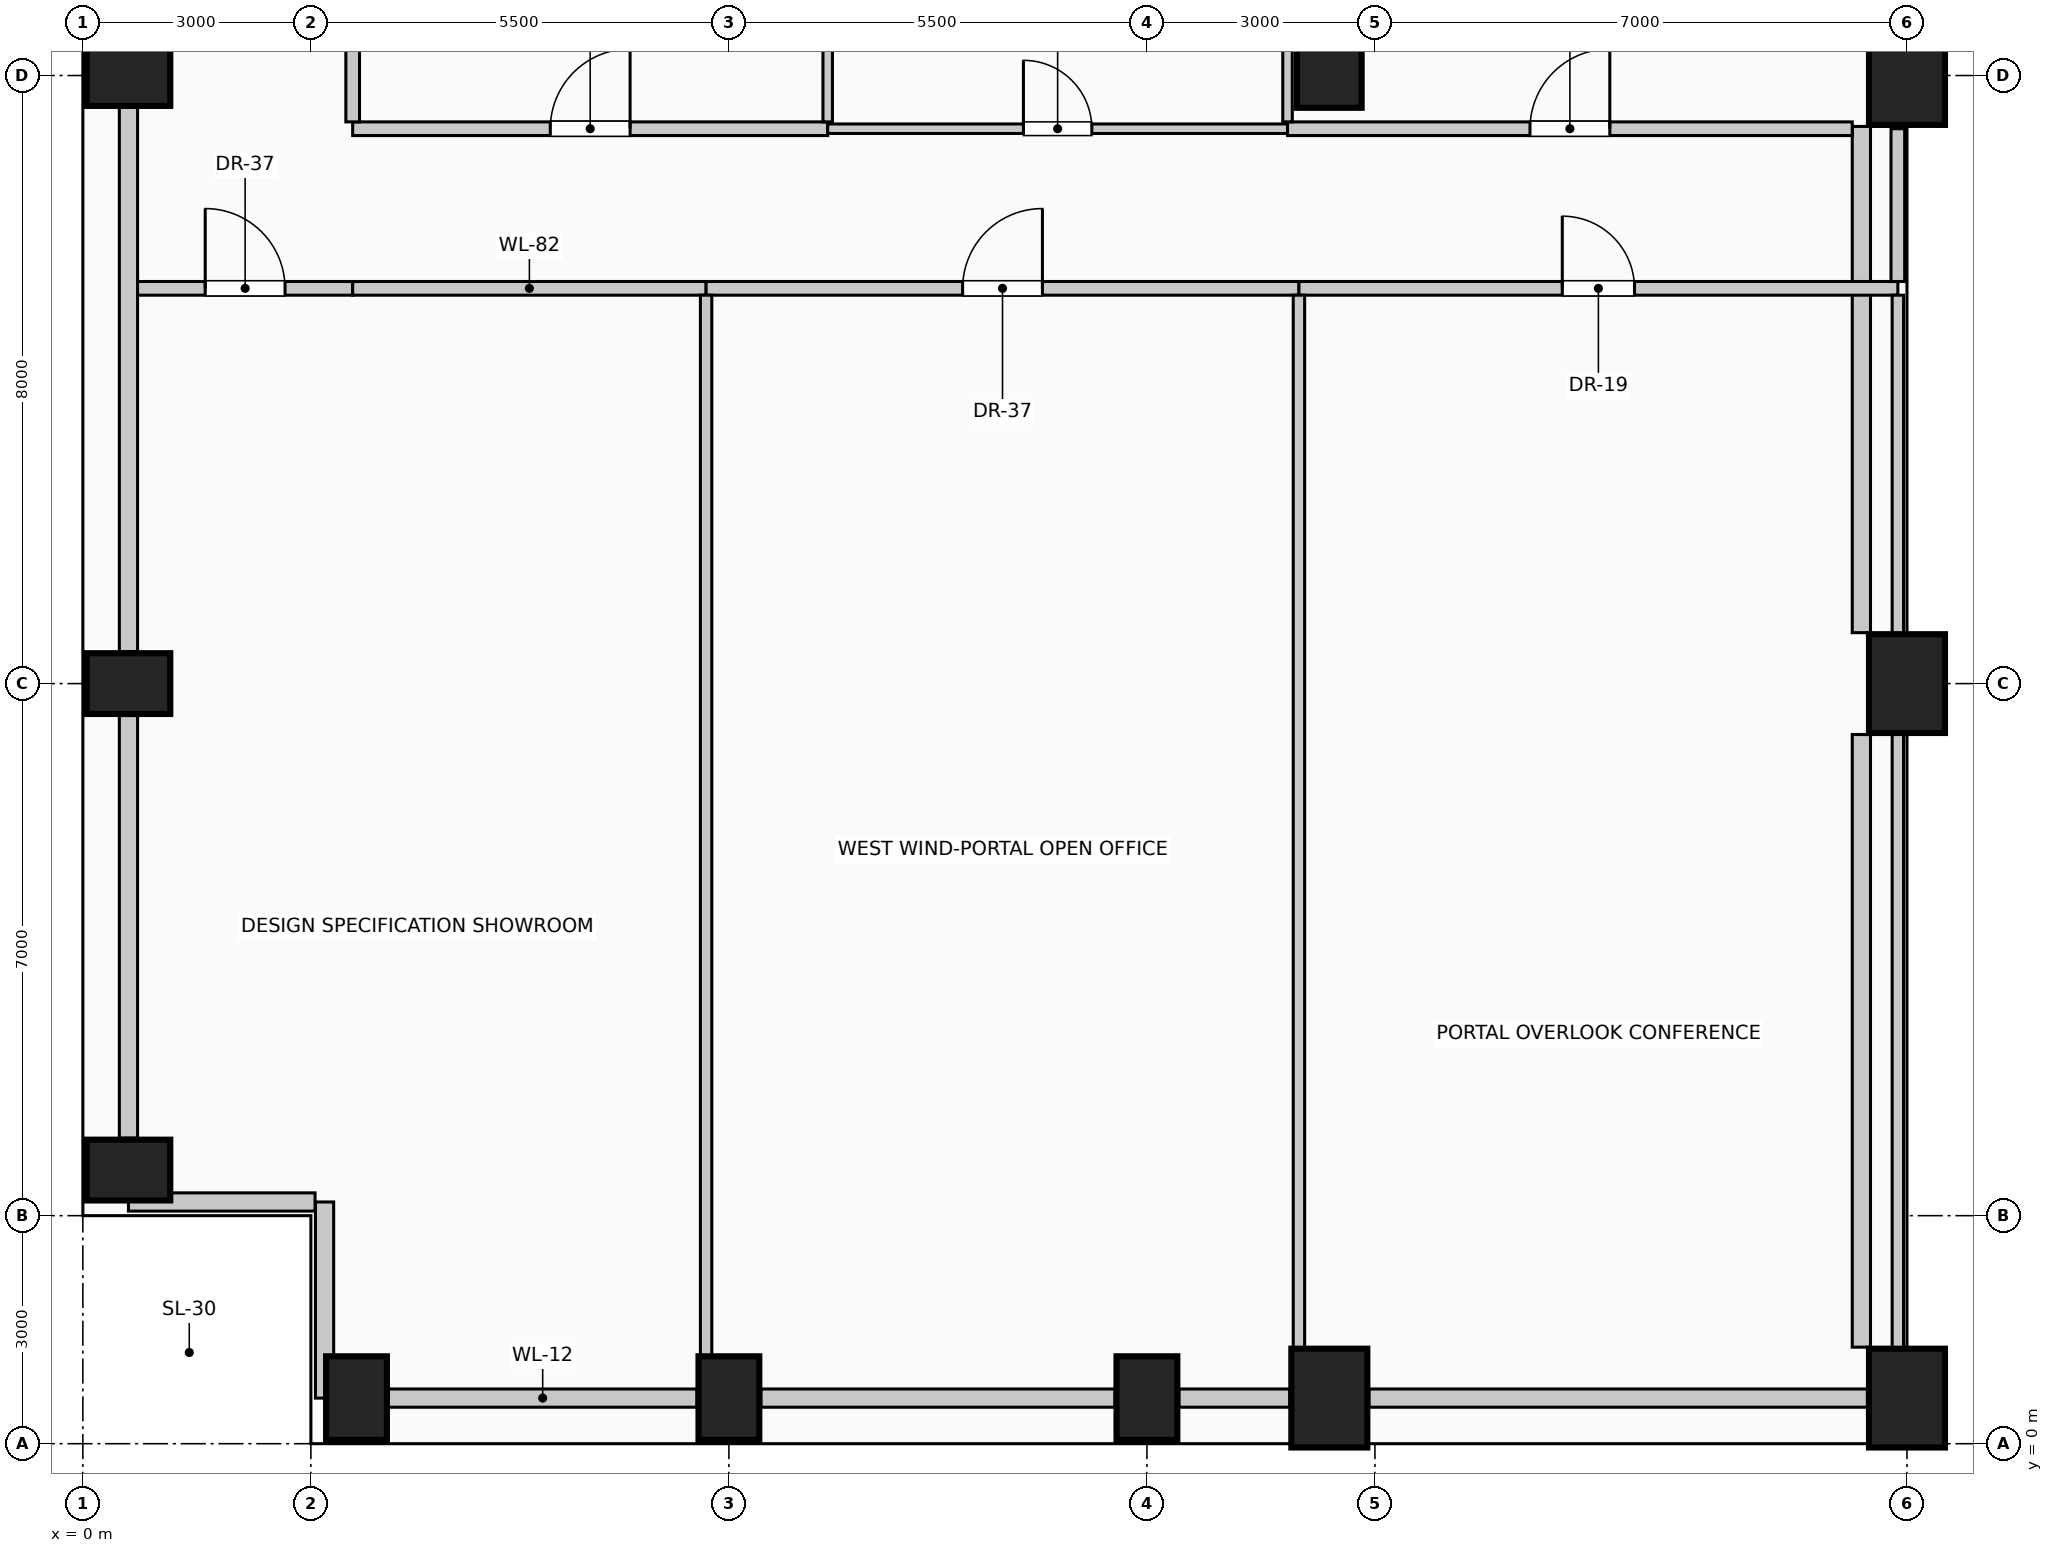
"""IFC4 building model, lengths in metres.
Left out: names, types, materials, properties, quantities, classifications, styles, units other than length and angle.
Written with IfcOpenShell. Run it as: python <this file> out.ifc"""

import sys

from ifc_helpers import new_model, si_unit, direction, frame, frame_2d, origin, origin_2d, place, context, subcontext, project, spatial, rectangle, circle, extrude, element, fill, save


model = new_model("IFC4")
c1 = context("Model", 3, precision=1e-05, world=origin(), true_north=direction((0.0, 1.0)))
c2 = subcontext(c1, "Body", "Model", "MODEL_VIEW")
j1 = project(units=[si_unit("LENGTHUNIT", "METRE"), si_unit("PLANEANGLEUNIT", "RADIAN")], contexts=[c1])
p1 = place(None, origin())
s1 = spatial("IfcSite", under=j1, at=p1, CompositionType="ELEMENT")
p2 = place(p1, origin())
s2 = spatial("IfcBuilding", under=s1, at=p2, CompositionType="ELEMENT")
p3 = place(p2, frame((0.0, 0.0, 198.6)))
s3 = spatial("IfcBuildingStorey", under=s2, at=p3, CompositionType="ELEMENT", Elevation=198.6)
for number, where, z_axis, x_axis in (
    (1, (3.6, 0.6, 0.0), (0.0, 0.0, 1.0), (1.0, 0.0, 0.0)),
    (2, (8.5, 0.6, 0.0), (0.0, 0.0, 1.0), (1.0, 0.0, 0.0)),
    (3, (14.0, 0.6, 0.0), (0.0, 0.0, 1.0), (1.0, 0.0, 0.0)),
):
    element("IfcColumn", number, at=place(p3, frame(where, z_axis=z_axis, x_axis=x_axis)), inside=s3, PredefinedType="COLUMN", context=c2, shape_type="SweptSolid", body=[
        extrude(rectangle(XDim=0.8, YDim=1.1, at=origin_2d()), origin(), (0.0, 0.0, 1.0), 4.0),
    ])
for number, where, z_axis, x_axis in (
    (4, (16.4, 0.6, 0.0), (0.0, 0.0, 1.0), (1.0, 0.0, 0.0)),
    (5, (24.0, 0.6, 0.0), (0.0, 0.0, 1.0), (1.0, 0.0, 0.0)),
):
    element("IfcColumn", number, at=place(p3, frame(where, z_axis=z_axis, x_axis=x_axis)), inside=s3, PredefinedType="COLUMN", context=c2, shape_type="SweptSolid", body=[
        extrude(rectangle(XDim=1.0, YDim=1.3, at=origin_2d()), origin(), (0.0, 0.0, 1.0), 4.0),
    ])
for number, where, z_axis, x_axis in (
    (6, (0.6, 3.6, 0.0), (0.0, 0.0, 1.0), (0.0, 1.0, 0.0)),
    (7, (0.6, 10.0, 0.0), (0.0, 0.0, 1.0), (0.0, 1.0, 0.0)),
    (8, (0.6, 18.0, 0.0), (0.0, 0.0, 1.0), (0.0, 1.0, 0.0)),
):
    element("IfcColumn", number, at=place(p3, frame(where, z_axis=z_axis, x_axis=x_axis)), inside=s3, PredefinedType="COLUMN", context=c2, shape_type="SweptSolid", body=[
        extrude(rectangle(XDim=0.8, YDim=1.1, at=origin_2d()), origin(), (0.0, 0.0, 1.0), 4.0),
    ])
for number, where, z_axis, x_axis in (
    (9, (24.0, 10.0, 0.0), (0.0, 0.0, 1.0), (1.0, 0.0, 0.0)),
    (10, (24.0, 18.0, 0.0), (0.0, 0.0, 1.0), (1.0, 0.0, 0.0)),
):
    element("IfcColumn", number, at=place(p3, frame(where, z_axis=z_axis, x_axis=x_axis)), inside=s3, PredefinedType="COLUMN", context=c2, shape_type="SweptSolid", body=[
        extrude(rectangle(XDim=1.0, YDim=1.3, at=origin_2d()), origin(), (0.0, 0.0, 1.0), 4.0),
    ])
p4 = place(p3, frame((16.4, 18.0, 0.0), z_axis=(0.0, 0.0, 1.0), x_axis=(1.0, 0.0, 0.0)))
e11 = element("IfcColumn", 11, at=p4, inside=s3, PredefinedType="COLUMN", context=c2, shape_type="SweptSolid", body=[
    extrude(circle(Radius=0.425, at=origin_2d()), origin(), (0.0, 0.0, 1.0), 4.0),
])
p5 = place(p3, frame((8.08, 0.6, 0.0), z_axis=(0.0, 0.0, 1.0), x_axis=(-1.0, 0.0, 0.0)))
e12 = element("IfcWall", 12, at=p5, inside=s3, PredefinedType="SOLIDWALL", context=c2, shape_type="SweptSolid", body=[
    extrude(rectangle(XDim=4.06, YDim=0.24, at=frame_2d((2.03, 0.0))), origin(), (0.0, 0.0, 1.0), 3.0),
])
p6 = place(p3, frame((13.58, 0.6, 0.0), z_axis=(0.0, 0.0, 1.0), x_axis=(-1.0, 0.0, 0.0)))
e13 = element("IfcWall", 13, at=p6, inside=s3, PredefinedType="SOLIDWALL", context=c2, shape_type="SweptSolid", body=[
    extrude(rectangle(XDim=4.66, YDim=0.24, at=frame_2d((2.33, 0.0))), origin(), (0.0, 0.0, 1.0), 3.0),
])
p7 = place(p3, frame((15.88, 0.6, 0.0), z_axis=(0.0, 0.0, 1.0), x_axis=(-1.0, 0.0, 0.0)))
e14 = element("IfcWall", 14, at=p7, inside=s3, PredefinedType="SOLIDWALL", context=c2, shape_type="SweptSolid", body=[
    extrude(rectangle(XDim=1.46, YDim=0.24, at=frame_2d((0.73, 0.0))), origin(), (0.0, 0.0, 1.0), 3.0),
])
p8 = place(p3, frame((23.48, 0.6, 0.0), z_axis=(0.0, 0.0, 1.0), x_axis=(-1.0, 0.0, 0.0)))
e15 = element("IfcWall", 15, at=p8, inside=s3, PredefinedType="SOLIDWALL", context=c2, shape_type="SweptSolid", body=[
    extrude(rectangle(XDim=6.56, YDim=0.24, at=frame_2d((3.28, 0.0))), origin(), (0.0, 0.0, 1.0), 3.0),
])
p9 = place(p3, frame((0.6, 4.02, 0.0), z_axis=(0.0, 0.0, 1.0), x_axis=(0.0, 1.0, 0.0)))
e16 = element("IfcWall", 16, at=p9, inside=s3, PredefinedType="SOLIDWALL", context=c2, shape_type="SweptSolid", body=[
    extrude(rectangle(XDim=5.56, YDim=0.24, at=frame_2d((2.78, 0.0))), origin(), (0.0, 0.0, 1.0), 3.0),
])
p10 = place(p3, frame((0.6, 10.42, 0.0), z_axis=(0.0, 0.0, 1.0), x_axis=(0.0, 1.0, 0.0)))
e17 = element("IfcWall", 17, at=p10, inside=s3, PredefinedType="SOLIDWALL", context=c2, shape_type="SweptSolid", body=[
    extrude(rectangle(XDim=7.16, YDim=0.24, at=frame_2d((3.58, 0.0))), origin(), (0.0, 0.0, 1.0), 3.0),
])
p11 = place(p3, frame((3.18, 0.6, 0.0), z_axis=(0.0, 0.0, 1.0), x_axis=(0.0, 1.0, 0.0)))
e18 = element("IfcWall", 18, at=p11, inside=s3, PredefinedType="SOLIDWALL", context=c2, shape_type="SweptSolid", body=[
    extrude(rectangle(XDim=2.58, YDim=0.24, at=frame_2d((1.29, 0.0))), origin(), (0.0, 0.0, 1.0), 3.75),
])
p12 = place(p3, frame((3.055, 3.18, 0.0), z_axis=(0.0, 0.0, 1.0), x_axis=(-1.0, 0.0, 0.0)))
e19 = element("IfcWall", 19, at=p12, inside=s3, PredefinedType="SOLIDWALL", context=c2, shape_type="SweptSolid", body=[
    extrude(rectangle(XDim=2.455, YDim=0.24, at=frame_2d((1.228, 0.0))), origin(), (0.0, 0.0, 1.0), 3.75),
])
p13 = place(p3, frame((23.4, 9.33, 0.0), z_axis=(0.0, 0.0, 1.0), x_axis=(0.0, -1.0, 0.0)))
e20 = element("IfcWall", 20, at=p13, inside=s3, PredefinedType="SOLIDWALL", context=c2, shape_type="SweptSolid", body=[
    extrude(rectangle(XDim=8.06, YDim=0.24, at=frame_2d((4.03, 0.0))), origin(), (0.0, 0.0, 1.0), 3.75),
])
p14 = place(p3, frame((23.4, 17.33, 0.0), z_axis=(0.0, 0.0, 1.0), x_axis=(0.0, -1.0, 0.0)))
e21 = element("IfcWall", 21, at=p14, inside=s3, PredefinedType="SOLIDWALL", context=c2, shape_type="SweptSolid", body=[
    extrude(rectangle(XDim=6.66, YDim=0.24, at=frame_2d((3.33, 0.0))), origin(), (0.0, 0.0, 1.0), 3.75),
])
p15 = place(p3, frame((0.72, 15.2, 0.0), z_axis=(0.0, 0.0, 1.0), x_axis=(1.0, 0.0, 0.0)))
e22 = element("IfcWall", 22, at=p15, inside=s3, PredefinedType="PARTITIONING", context=c2, shape_type="SweptSolid", body=[
    extrude(rectangle(XDim=2.83, YDim=0.18, at=frame_2d((1.415, 0.0))), origin(), (0.0, 0.0, 1.0), 3.75),
])
p16 = place(p15, frame((0.89, 0.0, 0.0)))
e23 = element("IfcOpeningElement", 23, at=p16, cuts=e22, PredefinedType="OPENING", context=c2, shape_type="SweptSolid", body=[
    extrude(rectangle(XDim=1.05, YDim=2.15, at=frame_2d((0.525, 1.075))), frame((0.0, 0.1, 0.0), z_axis=(0.0, -1.0, 0.0), x_axis=(1.0, 0.0, 0.0)), (0.0, 0.0, 1.0), 0.2),
])
p17 = place(p3, frame((3.55, 15.2, 0.0), z_axis=(0.0, 0.0, 1.0), x_axis=(1.0, 0.0, 0.0)))
e24 = element("IfcWall", 24, at=p17, inside=s3, PredefinedType="PARTITIONING", context=c2, shape_type="SweptSolid", body=[
    extrude(rectangle(XDim=4.65, YDim=0.18, at=frame_2d((2.325, 0.0))), origin(), (0.0, 0.0, 1.0), 3.75),
])
p18 = place(p3, frame((8.2, 15.2, 0.0), z_axis=(0.0, 0.0, 1.0), x_axis=(1.0, 0.0, 0.0)))
e25 = element("IfcWall", 25, at=p18, inside=s3, PredefinedType="PARTITIONING", context=c2, shape_type="SweptSolid", body=[
    extrude(rectangle(XDim=7.8, YDim=0.18, at=frame_2d((3.9, 0.0))), origin(), (0.0, 0.0, 1.0), 3.75),
])
p19 = place(p18, frame((3.375, 0.0, 0.0)))
e26 = element("IfcOpeningElement", 26, at=p19, cuts=e25, PredefinedType="OPENING", context=c2, shape_type="SweptSolid", body=[
    extrude(rectangle(XDim=1.05, YDim=2.15, at=frame_2d((0.525, 1.075))), frame((0.0, 0.1, 0.0), z_axis=(0.0, -1.0, 0.0), x_axis=(1.0, 0.0, 0.0)), (0.0, 0.0, 1.0), 0.2),
])
p20 = place(p3, frame((16.0, 15.2, 0.0), z_axis=(0.0, 0.0, 1.0), x_axis=(1.0, 0.0, 0.0)))
e27 = element("IfcWall", 27, at=p20, inside=s3, PredefinedType="PARTITIONING", context=c2, shape_type="SweptSolid", body=[
    extrude(rectangle(XDim=7.88, YDim=0.18, at=frame_2d((3.94, 0.0))), origin(), (0.0, 0.0, 1.0), 3.75),
])
p21 = place(p20, frame((3.465, 0.0, 0.0)))
e28 = element("IfcOpeningElement", 28, at=p21, cuts=e27, PredefinedType="OPENING", context=c2, shape_type="SweptSolid", body=[
    extrude(rectangle(XDim=0.95, YDim=2.15, at=frame_2d((0.475, 1.075))), frame((0.0, 0.1, 0.0), z_axis=(0.0, -1.0, 0.0), x_axis=(1.0, 0.0, 0.0)), (0.0, 0.0, 1.0), 0.2),
])
p22 = place(p3, frame((3.55, 17.3, 0.0), z_axis=(0.0, 0.0, 1.0), x_axis=(1.0, 0.0, 0.0)))
e29 = element("IfcWall", 29, at=p22, inside=s3, PredefinedType="PARTITIONING", context=c2, shape_type="SweptSolid", body=[
    extrude(rectangle(XDim=6.25, YDim=0.18, at=frame_2d((3.125, 0.0))), origin(), (0.0, 0.0, 1.0), 3.75),
])
p23 = place(p22, frame((2.6, 0.0, 0.0)))
e30 = element("IfcOpeningElement", 30, at=p23, cuts=e29, PredefinedType="OPENING", context=c2, shape_type="SweptSolid", body=[
    extrude(rectangle(XDim=1.05, YDim=2.15, at=frame_2d((0.525, 1.075))), frame((0.0, 0.1, 0.0), z_axis=(0.0, -1.0, 0.0), x_axis=(1.0, 0.0, 0.0)), (0.0, 0.0, 1.0), 0.2),
])
p24 = place(p3, frame((9.8, 17.3, 0.0), z_axis=(0.0, 0.0, 1.0), x_axis=(1.0, 0.0, 0.0)))
e31 = element("IfcWall", 31, at=p24, inside=s3, PredefinedType="PARTITIONING", context=c2, shape_type="SweptSolid", body=[
    extrude(rectangle(XDim=6.05, YDim=0.125, at=frame_2d((3.025, 0.0))), origin(), (0.0, 0.0, 1.0), 3.75),
])
p25 = place(p24, frame((2.575, 0.0, 0.0)))
e32 = element("IfcOpeningElement", 32, at=p25, cuts=e31, PredefinedType="OPENING", context=c2, shape_type="SweptSolid", body=[
    extrude(rectangle(XDim=0.9, YDim=2.1, at=frame_2d((0.45, 1.05))), frame((0.0, 0.073, 0.0), z_axis=(0.0, -1.0, 0.0), x_axis=(1.0, 0.0, 0.0)), (0.0, 0.0, 1.0), 0.145),
])
p26 = place(p3, frame((15.85, 17.3, 0.0), z_axis=(0.0, 0.0, 1.0), x_axis=(1.0, 0.0, 0.0)))
e33 = element("IfcWall", 33, at=p26, inside=s3, PredefinedType="PARTITIONING", context=c2, shape_type="SweptSolid", body=[
    extrude(rectangle(XDim=7.43, YDim=0.18, at=frame_2d((3.715, 0.0))), origin(), (0.0, 0.0, 1.0), 3.75),
])
p27 = place(p26, frame((3.19, 0.0, 0.0)))
e34 = element("IfcOpeningElement", 34, at=p27, cuts=e33, PredefinedType="OPENING", context=c2, shape_type="SweptSolid", body=[
    extrude(rectangle(XDim=1.05, YDim=2.15, at=frame_2d((0.525, 1.075))), frame((0.0, 0.1, 0.0), z_axis=(0.0, -1.0, 0.0), x_axis=(1.0, 0.0, 0.0)), (0.0, 0.0, 1.0), 0.2),
])
p28 = place(p3, frame((3.55, 17.39, 0.0), z_axis=(0.0, 0.0, 1.0), x_axis=(0.0, 1.0, 0.0)))
e35 = element("IfcWall", 35, at=p28, inside=s3, PredefinedType="PARTITIONING", context=c2, shape_type="SweptSolid", body=[
    extrude(rectangle(XDim=7.335, YDim=0.18, at=frame_2d((3.667, 0.0))), origin(), (0.0, 0.0, 1.0), 3.75),
])
p29 = place(p3, frame((8.2, 1.15, 0.0), z_axis=(0.0, 0.0, 1.0), x_axis=(0.0, 1.0, 0.0)))
e36 = element("IfcWall", 36, at=p29, inside=s3, PredefinedType="PARTITIONING", context=c2, shape_type="SweptSolid", body=[
    extrude(rectangle(XDim=13.96, YDim=0.15, at=frame_2d((6.98, 0.0))), origin(), (0.0, 0.0, 1.0), 3.75),
])
for number, where, z_axis, x_axis in (
    (37, (9.8, 17.39, 0.0), (0.0, 0.0, 1.0), (0.0, 1.0, 0.0)),
    (38, (15.85, 17.39, 0.0), (0.0, 0.0, 1.0), (0.0, 1.0, 0.0)),
):
    element("IfcWall", number, at=place(p3, frame(where, z_axis=z_axis, x_axis=x_axis)), inside=s3, PredefinedType="PARTITIONING", context=c2, shape_type="SweptSolid", body=[
        extrude(rectangle(XDim=7.335, YDim=0.125, at=frame_2d((3.667, 0.0))), origin(), (0.0, 0.0, 1.0), 3.75),
    ])
p30 = place(p3, frame((16.0, 1.25, 0.0), z_axis=(0.0, 0.0, 1.0), x_axis=(0.0, 1.0, 0.0)))
e39 = element("IfcWall", 39, at=p30, inside=s3, PredefinedType="PARTITIONING", context=c2, shape_type="SweptSolid", body=[
    extrude(rectangle(XDim=13.86, YDim=0.15, at=frame_2d((6.93, 0.0))), origin(), (0.0, 0.0, 1.0), 3.75),
])
p31 = place(p3, frame((23.88, 1.25, 0.0), z_axis=(0.0, 0.0, 1.0), x_axis=(0.0, 1.0, 0.0)))
e40 = element("IfcWall", 40, at=p31, inside=s3, PredefinedType="PARTITIONING", context=c2, shape_type="SweptSolid", body=[
    extrude(rectangle(XDim=8.1, YDim=0.15, at=frame_2d((4.05, 0.0))), origin(), (0.0, 0.0, 1.0), 3.145),
])
p32 = place(p3, frame((23.88, 10.65, 0.0), z_axis=(0.0, 0.0, 1.0), x_axis=(0.0, 1.0, 0.0)))
e41 = element("IfcWall", 41, at=p32, inside=s3, PredefinedType="PARTITIONING", context=c2, shape_type="SweptSolid", body=[
    extrude(rectangle(XDim=4.46, YDim=0.15, at=frame_2d((2.23, 0.0))), origin(), (0.0, 0.0, 1.0), 3.145),
])
p33 = place(p3, frame((23.88, 15.29, 0.0), z_axis=(0.0, 0.0, 1.0), x_axis=(0.0, 1.0, 0.0)))
e42 = element("IfcWall", 42, at=p33, inside=s3, PredefinedType="PARTITIONING", context=c2, shape_type="SweptSolid", body=[
    extrude(rectangle(XDim=2.01, YDim=0.18, at=frame_2d((1.005, 0.0))), origin(), (0.0, 0.0, 1.0), 3.145),
])
p34 = place(p16, origin())
e43 = element("IfcDoor", 43, at=p34, inside=s3, OperationType="SINGLE_SWING_LEFT", PredefinedType="DOOR", context=c2, shape_type="SweptSolid", body=[
    extrude(rectangle(XDim=1.05, YDim=2.15, at=frame_2d((0.525, 1.075))), frame((0.0, 0.025, 0.0), z_axis=(0.0, -1.0, 0.0), x_axis=(1.0, 0.0, 0.0)), (0.0, 0.0, 1.0), 0.05),
])
fill(e23, e43)
p35 = place(p19, origin())
e44 = element("IfcDoor", 44, at=p35, inside=s3, OperationType="SINGLE_SWING_RIGHT", PredefinedType="DOOR", context=c2, shape_type="SweptSolid", body=[
    extrude(rectangle(XDim=1.05, YDim=2.15, at=frame_2d((0.525, 1.075))), frame((0.0, 0.025, 0.0), z_axis=(0.0, -1.0, 0.0), x_axis=(1.0, 0.0, 0.0)), (0.0, 0.0, 1.0), 0.05),
])
fill(e26, e44)
p36 = place(p21, origin())
e45 = element("IfcDoor", 45, at=p36, inside=s3, OperationType="SINGLE_SWING_LEFT", PredefinedType="DOOR", context=c2, shape_type="SweptSolid", body=[
    extrude(rectangle(XDim=0.95, YDim=2.15, at=frame_2d((0.475, 1.075))), frame((0.0, 0.025, 0.0), z_axis=(0.0, -1.0, 0.0), x_axis=(1.0, 0.0, 0.0)), (0.0, 0.0, 1.0), 0.05),
])
fill(e28, e45)
p37 = place(p23, origin())
e46 = element("IfcDoor", 46, at=p37, inside=s3, OperationType="SINGLE_SWING_RIGHT", PredefinedType="DOOR", context=c2, shape_type="SweptSolid", body=[
    extrude(rectangle(XDim=1.05, YDim=2.15, at=frame_2d((0.525, 1.075))), frame((0.0, 0.025, 0.0), z_axis=(0.0, -1.0, 0.0), x_axis=(1.0, 0.0, 0.0)), (0.0, 0.0, 1.0), 0.05),
])
fill(e30, e46)
p38 = place(p25, origin())
e47 = element("IfcDoor", 47, at=p38, inside=s3, OperationType="SINGLE_SWING_LEFT", PredefinedType="DOOR", context=c2, shape_type="SweptSolid", body=[
    extrude(rectangle(XDim=0.9, YDim=2.1, at=frame_2d((0.45, 1.05))), frame((0.0, 0.025, 0.0), z_axis=(0.0, -1.0, 0.0), x_axis=(1.0, 0.0, 0.0)), (0.0, 0.0, 1.0), 0.05),
])
fill(e32, e47)
p39 = place(p27, origin())
e48 = element("IfcDoor", 48, at=p39, inside=s3, OperationType="SINGLE_SWING_RIGHT", PredefinedType="DOOR", context=c2, shape_type="SweptSolid", body=[
    extrude(rectangle(XDim=1.05, YDim=2.15, at=frame_2d((0.525, 1.075))), frame((0.0, 0.025, 0.0), z_axis=(0.0, -1.0, 0.0), x_axis=(1.0, 0.0, 0.0)), (0.0, 0.0, 1.0), 0.05),
])
fill(e34, e48)
save(model, sys.argv[1])
